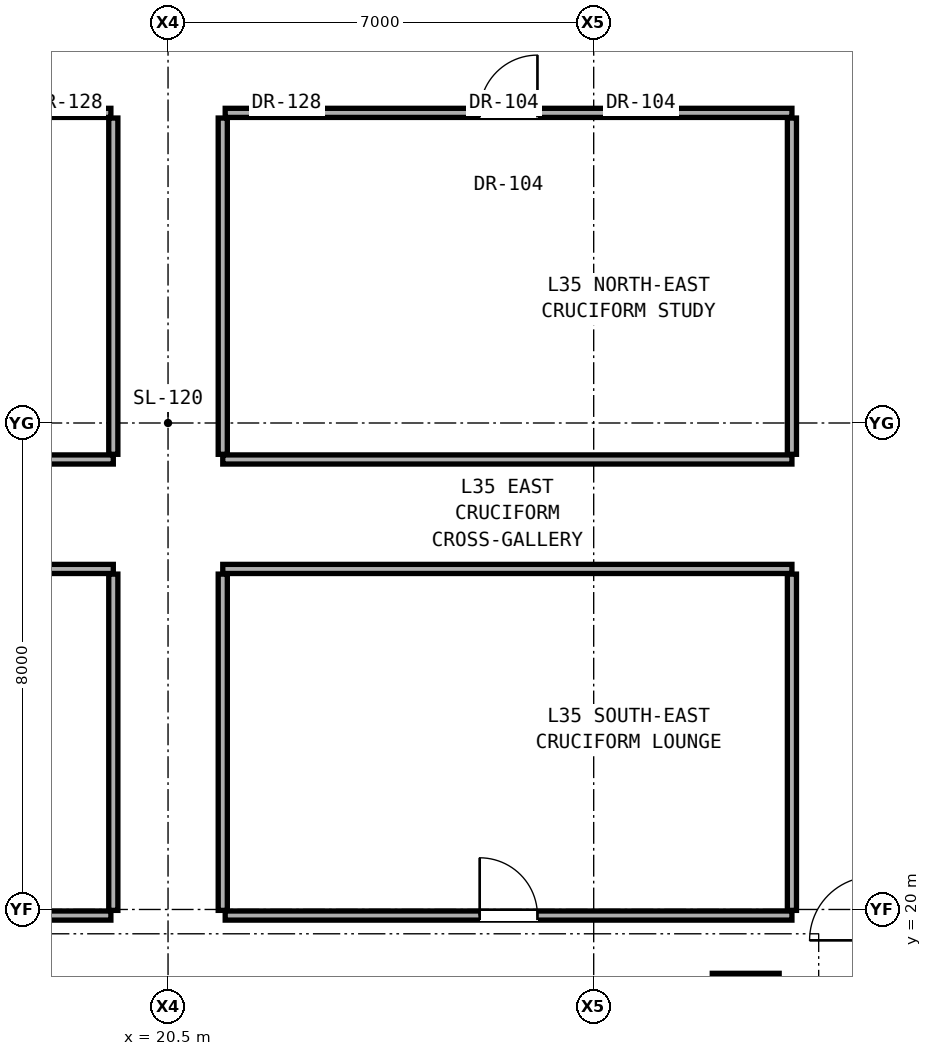
"""IFC4 building model, lengths in metres.
Left out: names, types, materials, properties, quantities, classifications, styles, units other than length and angle.
Written with IfcOpenShell. Run it as: python <this file> out.ifc"""

import sys

from ifc_helpers import new_model, si_unit, direction, frame, frame_2d, origin, origin_2d, place, context, subcontext, project, spatial, rectangle, extrude, element, fill, save


model = new_model("IFC4")
c1 = context("Model", 3, precision=1e-05, world=origin(), true_north=direction((0.0, 1.0)))
c2 = subcontext(c1, "Body", "Model", "MODEL_VIEW")
j1 = project(units=[si_unit("LENGTHUNIT", "METRE"), si_unit("PLANEANGLEUNIT", "RADIAN")], contexts=[c1])
p1 = place(None, origin())
s1 = spatial("IfcSite", under=j1, at=p1, CompositionType="ELEMENT")
p2 = place(p1, origin())
s2 = spatial("IfcBuilding", under=s1, at=p2, CompositionType="ELEMENT")
p3 = place(p2, frame((0.0, 0.0, 124.7)))
s3 = spatial("IfcBuildingStorey", under=s2, at=p3, CompositionType="ELEMENT", Elevation=124.7)
p4 = place(p3, frame((30.0, 18.4, 0.0), z_axis=(0.0, 0.0, 1.0), x_axis=(1.0, 0.0, 0.0)))
e1 = element("IfcColumn", 1, at=p4, inside=s3, PredefinedType="COLUMN", context=c2, shape_type="SweptSolid", body=[
    extrude(rectangle(XDim=1.1, YDim=1.1, at=origin_2d()), origin(), (0.0, 0.0, 1.0), 3.3),
])
p5 = place(p3, frame((10.22, 19.9, 0.0), z_axis=(0.0, 0.0, 1.0), x_axis=(1.0, 0.0, 0.0)))
e2 = element("IfcWall", 2, at=p5, inside=s3, PredefinedType="PARTITIONING", context=c2, shape_type="SweptSolid", body=[
    extrude(rectangle(XDim=9.34, YDim=0.15, at=frame_2d((4.67, 0.0))), origin(), (0.0, 0.0, 1.0), 2.216),
])
p6 = place(p5, frame((1.66, 0.0, 0.0)))
e3 = element("IfcOpeningElement", 3, at=p6, cuts=e2, PredefinedType="OPENING", context=c2, shape_type="SweptSolid", body=[
    extrude(rectangle(XDim=0.9, YDim=2.1, at=frame_2d((0.45, 1.05))), frame((0.0, 0.085, 0.0), z_axis=(0.0, -1.0, 0.0), x_axis=(1.0, 0.0, 0.0)), (0.0, 0.0, 1.0), 0.17),
])
p7 = place(p5, frame((5.665, 0.0, 0.0)))
e4 = element("IfcOpeningElement", 4, at=p7, cuts=e2, PredefinedType="OPENING", context=c2, shape_type="SweptSolid", body=[
    extrude(rectangle(XDim=0.95, YDim=2.15, at=frame_2d((0.475, 1.075))), frame((0.0, 0.085, 0.0), z_axis=(0.0, -1.0, 0.0), x_axis=(1.0, 0.0, 0.0)), (0.0, 0.0, 1.0), 0.17),
])
p8 = place(p3, frame((21.44, 19.9, 0.0), z_axis=(0.0, 0.0, 1.0), x_axis=(1.0, 0.0, 0.0)))
e5 = element("IfcWall", 5, at=p8, inside=s3, PredefinedType="PARTITIONING", context=c2, shape_type="SweptSolid", body=[
    extrude(rectangle(XDim=9.32, YDim=0.15, at=frame_2d((4.66, 0.0))), origin(), (0.0, 0.0, 1.0), 2.216),
])
p9 = place(p8, frame((4.185, 0.0, 0.0)))
e6 = element("IfcOpeningElement", 6, at=p9, cuts=e5, PredefinedType="OPENING", context=c2, shape_type="SweptSolid", body=[
    extrude(rectangle(XDim=0.95, YDim=2.15, at=frame_2d((0.475, 1.075))), frame((0.0, 0.085, 0.0), z_axis=(0.0, -1.0, 0.0), x_axis=(1.0, 0.0, 0.0)), (0.0, 0.0, 1.0), 0.17),
])
for number, where, z_axis, x_axis in (
    (7, (10.24, 25.6, 0.0), (0.0, 0.0, 1.0), (1.0, 0.0, 0.0)),
    (8, (21.4, 25.6, 0.0), (0.0, 0.0, 1.0), (1.0, 0.0, 0.0)),
    (9, (10.24, 27.4, 0.0), (0.0, 0.0, 1.0), (1.0, 0.0, 0.0)),
    (10, (21.4, 27.4, 0.0), (0.0, 0.0, 1.0), (1.0, 0.0, 0.0)),
):
    element("IfcWall", number, at=place(p3, frame(where, z_axis=z_axis, x_axis=x_axis)), inside=s3, PredefinedType="PARTITIONING", context=c2, shape_type="SweptSolid", body=[
        extrude(rectangle(XDim=9.36, YDim=0.15, at=frame_2d((4.68, 0.0))), origin(), (0.0, 0.0, 1.0), 2.216),
    ])
p10 = place(p3, frame((10.24, 33.1, 0.0), z_axis=(0.0, 0.0, 1.0), x_axis=(1.0, 0.0, 0.0)))
e11 = element("IfcWall", 11, at=p10, inside=s3, PredefinedType="PARTITIONING", context=c2, shape_type="SweptSolid", body=[
    extrude(rectangle(XDim=9.32, YDim=0.15, at=frame_2d((4.66, 0.0))), origin(), (0.0, 0.0, 1.0), 2.216),
])
p11 = place(p3, frame((21.44, 33.1, 0.0), z_axis=(0.0, 0.0, 1.0), x_axis=(1.0, 0.0, 0.0)))
e12 = element("IfcWall", 12, at=p11, inside=s3, PredefinedType="PARTITIONING", context=c2, shape_type="SweptSolid", body=[
    extrude(rectangle(XDim=9.32, YDim=0.15, at=frame_2d((4.66, 0.0))), origin(), (0.0, 0.0, 1.0), 2.216),
])
p12 = place(p11, frame((4.185, 0.0, 0.0)))
e13 = element("IfcOpeningElement", 13, at=p12, cuts=e12, PredefinedType="OPENING", context=c2, shape_type="SweptSolid", body=[
    extrude(rectangle(XDim=0.95, YDim=2.15, at=frame_2d((0.475, 1.075))), frame((0.0, 0.085, 0.0), z_axis=(0.0, -1.0, 0.0), x_axis=(1.0, 0.0, 0.0)), (0.0, 0.0, 1.0), 0.17),
])
for number, where, z_axis, x_axis in (
    (14, (19.6, 19.985, 0.0), (0.0, 0.0, 1.0), (0.0, 1.0, 0.0)),
    (15, (19.6, 27.485, 0.0), (0.0, 0.0, 1.0), (0.0, 1.0, 0.0)),
    (16, (21.4, 19.985, 0.0), (0.0, 0.0, 1.0), (0.0, 1.0, 0.0)),
    (17, (21.4, 27.485, 0.0), (0.0, 0.0, 1.0), (0.0, 1.0, 0.0)),
):
    element("IfcWall", number, at=place(p3, frame(where, z_axis=z_axis, x_axis=x_axis)), inside=s3, PredefinedType="PARTITIONING", context=c2, shape_type="SweptSolid", body=[
        extrude(rectangle(XDim=5.53, YDim=0.15, at=frame_2d((2.765, 0.0))), origin(), (0.0, 0.0, 1.0), 2.216),
    ])
for number, where, z_axis, x_axis in (
    (18, (30.76, 19.985, 0.0), (0.0, 0.0, 1.0), (0.0, 1.0, 0.0)),
    (19, (30.76, 27.485, 0.0), (0.0, 0.0, 1.0), (0.0, 1.0, 0.0)),
):
    element("IfcWall", number, at=place(p3, frame(where, z_axis=z_axis, x_axis=x_axis)), inside=s3, PredefinedType="PARTITIONING", context=c2, shape_type="SweptSolid", body=[
        extrude(rectangle(XDim=5.53, YDim=0.15, at=frame_2d((2.765, 0.0))), origin(), (0.0, 0.0, 1.0), 2.299),
    ])
p13 = place(p9, origin())
e20 = element("IfcDoor", 20, at=p13, inside=s3, OperationType="SINGLE_SWING_LEFT", PredefinedType="DOOR", context=c2, shape_type="SweptSolid", body=[
    extrude(rectangle(XDim=0.95, YDim=2.15, at=frame_2d((0.475, 1.075))), frame((0.0, 0.025, 0.0), z_axis=(0.0, -1.0, 0.0), x_axis=(1.0, 0.0, 0.0)), (0.0, 0.0, 1.0), 0.05),
])
fill(e6, e20)
p14 = place(p12, origin())
e21 = element("IfcDoor", 21, at=p14, inside=s3, OperationType="SINGLE_SWING_RIGHT", PredefinedType="DOOR", context=c2, shape_type="SweptSolid", body=[
    extrude(rectangle(XDim=0.95, YDim=2.15, at=frame_2d((0.475, 1.075))), frame((0.0, 0.025, 0.0), z_axis=(0.0, -1.0, 0.0), x_axis=(1.0, 0.0, 0.0)), (0.0, 0.0, 1.0), 0.05),
])
fill(e13, e21)
save(model, sys.argv[1])
